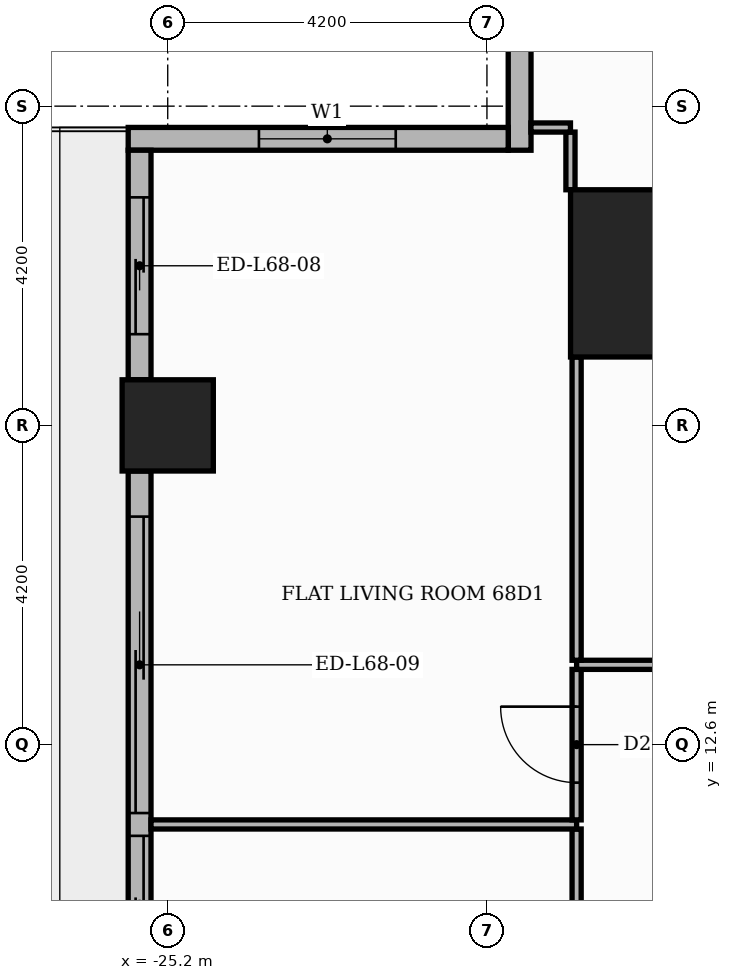
"""IFC4 building model, lengths in metres.
Left out: names, types, materials, properties, quantities, classifications, styles, units other than length and angle.
Written with IfcOpenShell. Run it as: python <this file> out.ifc"""

import sys

from ifc_helpers import new_model, si_unit, direction, frame, frame_2d, origin, origin_2d, place, context, subcontext, project, spatial, rectangle, extrude, element, fill, save


model = new_model("IFC4")
c1 = context("Model", 3, precision=1e-05, world=origin(), true_north=direction((0.0, 1.0)))
c2 = subcontext(c1, "Body", "Model", "MODEL_VIEW")
j1 = project(units=[si_unit("LENGTHUNIT", "METRE"), si_unit("PLANEANGLEUNIT", "RADIAN")], contexts=[c1])
p1 = place(None, origin())
s1 = spatial("IfcSite", under=j1, at=p1, CompositionType="ELEMENT")
p2 = place(p1, origin())
s2 = spatial("IfcBuilding", under=s1, at=p2, CompositionType="ELEMENT")
p3 = place(p2, frame((0.0, 0.0, 283.5)))
s3 = spatial("IfcBuildingStorey", under=s2, at=p3, CompositionType="ELEMENT", Elevation=283.5)
p4 = place(p3, frame((-18.8, 18.8, 0.0), z_axis=(0.0, 0.0, 1.0), x_axis=(1.0, 0.0, 0.0)))
e1 = element("IfcColumn", 1, at=p4, inside=s3, PredefinedType="COLUMN", context=c2, shape_type="SweptSolid", body=[
    extrude(rectangle(XDim=2.2, YDim=2.2, at=origin_2d()), origin(), (0.0, 0.0, 1.0), 3.9),
])
p5 = place(p3, frame((-25.2, 16.8, 0.0), z_axis=(0.0, 0.0, 1.0), x_axis=(1.0, 0.0, 0.0)))
e2 = element("IfcColumn", 2, at=p5, inside=s3, PredefinedType="COLUMN", context=c2, shape_type="SweptSolid", body=[
    extrude(rectangle(XDim=1.2, YDim=1.2, at=origin_2d()), origin(), (0.0, 0.0, 1.0), 3.9),
])
p6 = place(p3, frame((-20.57, 25.42, 0.0), z_axis=(0.0, 0.0, 1.0), x_axis=(0.0, -1.0, 0.0)))
e3 = element("IfcWall", 3, at=p6, inside=s3, PredefinedType="STANDARD", context=c2, shape_type="SweptSolid", body=[
    extrude(rectangle(XDim=5.0, YDim=0.3, at=frame_2d((2.5, 0.0))), origin(), (0.0, 0.0, 1.0), 3.4),
])
p7 = place(p6, frame((1.42, 0.0, 0.9)))
e4 = element("IfcOpeningElement", 4, at=p7, cuts=e3, PredefinedType="OPENING", context=c2, shape_type="SweptSolid", body=[
    extrude(rectangle(XDim=1.8, YDim=2.1, at=frame_2d((0.9, 1.05))), frame((0.0, 0.16, 0.0), z_axis=(0.0, -1.0, 0.0), x_axis=(1.0, 0.0, 0.0)), (0.0, 0.0, 1.0), 0.32),
])
p8 = place(p3, frame((-20.72, 20.57, 0.0), z_axis=(0.0, 0.0, 1.0), x_axis=(-1.0, 0.0, 0.0)))
e5 = element("IfcWall", 5, at=p8, inside=s3, PredefinedType="STANDARD", context=c2, shape_type="SweptSolid", body=[
    extrude(rectangle(XDim=5.0, YDim=0.3, at=frame_2d((2.5, 0.0))), origin(), (0.0, 0.0, 1.0), 3.4),
])
p9 = place(p8, frame((1.48, 0.0, 0.9)))
e6 = element("IfcOpeningElement", 6, at=p9, cuts=e5, PredefinedType="OPENING", context=c2, shape_type="SweptSolid", body=[
    extrude(rectangle(XDim=1.8, YDim=2.1, at=frame_2d((0.9, 1.05))), frame((0.0, 0.16, 0.0), z_axis=(0.0, -1.0, 0.0), x_axis=(1.0, 0.0, 0.0)), (0.0, 0.0, 1.0), 0.32),
])
p10 = place(p3, frame((-25.57, 20.42, 0.0), z_axis=(0.0, 0.0, 1.0), x_axis=(0.0, -1.0, 0.0)))
e7 = element("IfcWall", 7, at=p10, inside=s3, PredefinedType="STANDARD", context=c2, shape_type="SweptSolid", body=[
    extrude(rectangle(XDim=3.02, YDim=0.3, at=frame_2d((1.51, 0.0))), origin(), (0.0, 0.0, 1.0), 3.4),
])
p11 = place(p10, frame((0.62, 0.0, 0.0)))
e8 = element("IfcOpeningElement", 8, at=p11, cuts=e7, PredefinedType="OPENING", context=c2, shape_type="SweptSolid", body=[
    extrude(rectangle(XDim=1.8, YDim=2.4, at=frame_2d((0.9, 1.2))), frame((0.0, 0.16, 0.0), z_axis=(0.0, -1.0, 0.0), x_axis=(1.0, 0.0, 0.0)), (0.0, 0.0, 1.0), 0.32),
])
p12 = place(p3, frame((-25.57, 16.2, 0.0), z_axis=(0.0, 0.0, 1.0), x_axis=(0.0, -1.0, 0.0)))
e9 = element("IfcWall", 9, at=p12, inside=s3, PredefinedType="STANDARD", context=c2, shape_type="SweptSolid", body=[
    extrude(rectangle(XDim=7.2, YDim=0.3, at=frame_2d((3.6, 0.0))), origin(), (0.0, 0.0, 1.0), 3.4),
])
p13 = place(p12, frame((0.6, 0.0, 0.0)))
e10 = element("IfcOpeningElement", 10, at=p13, cuts=e9, PredefinedType="OPENING", context=c2, shape_type="SweptSolid", body=[
    extrude(rectangle(XDim=3.9, YDim=2.4, at=frame_2d((1.95, 1.2))), frame((0.0, 0.16, 0.0), z_axis=(0.0, -1.0, 0.0), x_axis=(1.0, 0.0, 0.0)), (0.0, 0.0, 1.0), 0.32),
])
p14 = place(p12, frame((4.8, 0.0, 0.0)))
e11 = element("IfcOpeningElement", 11, at=p14, cuts=e9, PredefinedType="OPENING", context=c2, shape_type="SweptSolid", body=[
    extrude(rectangle(XDim=1.8, YDim=2.4, at=frame_2d((0.9, 1.2))), frame((0.0, 0.16, 0.0), z_axis=(0.0, -1.0, 0.0), x_axis=(1.0, 0.0, 0.0)), (0.0, 0.0, 1.0), 0.32),
])
p15 = place(p3, frame((-19.82, 7.41, 0.0), z_axis=(0.0, 0.0, 1.0), x_axis=(0.0, 1.0, 0.0)))
e12 = element("IfcWall", 12, at=p15, inside=s3, PredefinedType="PARTITIONING", context=c2, shape_type="SweptSolid", body=[
    extrude(rectangle(XDim=4.08, YDim=0.12, at=frame_2d((2.04, 0.0))), origin(), (0.0, 0.0, 1.0), 3.4),
])
p16 = place(p15, frame((1.59, 0.0, 0.0)))
e13 = element("IfcOpeningElement", 13, at=p16, cuts=e12, PredefinedType="OPENING", context=c2, shape_type="SweptSolid", body=[
    extrude(rectangle(XDim=0.9, YDim=2.1, at=frame_2d((0.45, 1.05))), frame((0.0, 0.07, 0.0), z_axis=(0.0, -1.0, 0.0), x_axis=(1.0, 0.0, 0.0)), (0.0, 0.0, 1.0), 0.14),
])
p17 = place(p3, frame((-25.42, 11.55, 0.0), z_axis=(0.0, 0.0, 1.0), x_axis=(1.0, 0.0, 0.0)))
e14 = element("IfcWall", 14, at=p17, inside=s3, PredefinedType="PARTITIONING", context=c2, shape_type="SweptSolid", body=[
    extrude(rectangle(XDim=5.6, YDim=0.12, at=frame_2d((2.8, 0.0))), origin(), (0.0, 0.0, 1.0), 3.4),
])
p18 = place(p3, frame((-19.82, 11.61, 0.0), z_axis=(0.0, 0.0, 1.0), x_axis=(0.0, 1.0, 0.0)))
e15 = element("IfcWall", 15, at=p18, inside=s3, PredefinedType="PARTITIONING", context=c2, shape_type="SweptSolid", body=[
    extrude(rectangle(XDim=1.98, YDim=0.12, at=frame_2d((0.99, 0.0))), origin(), (0.0, 0.0, 1.0), 3.4),
])
p19 = place(p18, frame((0.49, 0.0, 0.0)))
e16 = element("IfcOpeningElement", 16, at=p19, cuts=e15, PredefinedType="OPENING", context=c2, shape_type="SweptSolid", body=[
    extrude(rectangle(XDim=1.0, YDim=2.1, at=frame_2d((0.5, 1.05))), frame((0.0, 0.07, 0.0), z_axis=(0.0, -1.0, 0.0), x_axis=(1.0, 0.0, 0.0)), (0.0, 0.0, 1.0), 0.14),
])
p20 = place(p3, frame((-19.82, 13.65, 0.0), z_axis=(0.0, 0.0, 1.0), x_axis=(1.0, 0.0, 0.0)))
e17 = element("IfcWall", 17, at=p20, inside=s3, PredefinedType="PARTITIONING", context=c2, shape_type="SweptSolid", body=[
    extrude(rectangle(XDim=6.17, YDim=0.12, at=frame_2d((3.085, 0.0))), origin(), (0.0, 0.0, 1.0), 3.4),
])
p21 = place(p20, frame((2.635, 0.0, 0.0)))
e18 = element("IfcOpeningElement", 18, at=p21, cuts=e17, PredefinedType="OPENING", context=c2, shape_type="SweptSolid", body=[
    extrude(rectangle(XDim=0.9, YDim=2.1, at=frame_2d((0.45, 1.05))), frame((0.0, 0.07, 0.0), z_axis=(0.0, -1.0, 0.0), x_axis=(1.0, 0.0, 0.0)), (0.0, 0.0, 1.0), 0.14),
])
p22 = place(p3, frame((-19.82, 13.71, 0.0), z_axis=(0.0, 0.0, 1.0), x_axis=(0.0, 1.0, 0.0)))
e19 = element("IfcWall", 19, at=p22, inside=s3, PredefinedType="PARTITIONING", context=c2, shape_type="SweptSolid", body=[
    extrude(rectangle(XDim=3.99, YDim=0.12, at=frame_2d((1.995, 0.0))), origin(), (0.0, 0.0, 1.0), 3.4),
])
p23 = place(p3, frame((-19.901, 19.9, 0.0), z_axis=(0.0, 0.0, 1.0), x_axis=(0.0, 1.0, 0.0)))
e20 = element("IfcWall", 20, at=p23, inside=s3, PredefinedType="PARTITIONING", context=c2, shape_type="SweptSolid", body=[
    extrude(rectangle(XDim=0.759, YDim=0.12, at=frame_2d((0.379, 0.0))), origin(), (0.0, 0.0, 1.0), 3.4),
])
p24 = place(p3, frame((-20.421, 20.719, 0.0), z_axis=(0.0, 0.0, 1.0), x_axis=(1.0, 0.0, 0.0)))
e21 = element("IfcWall", 21, at=p24, inside=s3, PredefinedType="PARTITIONING", context=c2, shape_type="SweptSolid", body=[
    extrude(rectangle(XDim=0.52, YDim=0.12, at=frame_2d((0.26, 0.0))), origin(), (0.0, 0.0, 1.0), 3.4),
])
p25 = place(p9, origin())
e22 = element("IfcWindow", 22, at=p25, inside=s3, PartitioningType="SINGLE_PANEL", PredefinedType="WINDOW", context=c2, shape_type="SweptSolid", body=[
    extrude(rectangle(XDim=1.8, YDim=2.1, at=frame_2d((0.9, 1.05))), frame((0.0, 0.03, 0.0), z_axis=(0.0, -1.0, 0.0), x_axis=(1.0, 0.0, 0.0)), (0.0, 0.0, 1.0), 0.06),
])
fill(e6, e22)
p26 = place(p11, origin())
e23 = element("IfcDoor", 23, at=p26, inside=s3, OperationType="SLIDING_TO_RIGHT", PredefinedType="DOOR", context=c2, shape_type="SweptSolid", body=[
    extrude(rectangle(XDim=1.8, YDim=2.4, at=frame_2d((0.9, 1.2))), frame((0.0, 0.025, 0.0), z_axis=(0.0, -1.0, 0.0), x_axis=(1.0, 0.0, 0.0)), (0.0, 0.0, 1.0), 0.05),
])
fill(e8, e23)
p27 = place(p13, origin())
e24 = element("IfcDoor", 24, at=p27, inside=s3, OperationType="SLIDING_TO_LEFT", PredefinedType="DOOR", context=c2, shape_type="SweptSolid", body=[
    extrude(rectangle(XDim=3.9, YDim=2.4, at=frame_2d((1.95, 1.2))), frame((0.0, 0.025, 0.0), z_axis=(0.0, -1.0, 0.0), x_axis=(1.0, 0.0, 0.0)), (0.0, 0.0, 1.0), 0.05),
])
fill(e10, e24)
p28 = place(p14, origin())
e25 = element("IfcDoor", 25, at=p28, inside=s3, OperationType="SLIDING_TO_RIGHT", PredefinedType="DOOR", context=c2, shape_type="SweptSolid", body=[
    extrude(rectangle(XDim=1.8, YDim=2.4, at=frame_2d((0.9, 1.2))), frame((0.0, 0.025, 0.0), z_axis=(0.0, -1.0, 0.0), x_axis=(1.0, 0.0, 0.0)), (0.0, 0.0, 1.0), 0.05),
])
fill(e11, e25)
p29 = place(p19, origin())
e26 = element("IfcDoor", 26, at=p29, inside=s3, OperationType="SINGLE_SWING_RIGHT", PredefinedType="DOOR", context=c2, shape_type="SweptSolid", body=[
    extrude(rectangle(XDim=1.0, YDim=2.1, at=frame_2d((0.5, 1.05))), frame((0.0, 0.025, 0.0), z_axis=(0.0, -1.0, 0.0), x_axis=(1.0, 0.0, 0.0)), (0.0, 0.0, 1.0), 0.05),
])
fill(e16, e26)
save(model, sys.argv[1])
